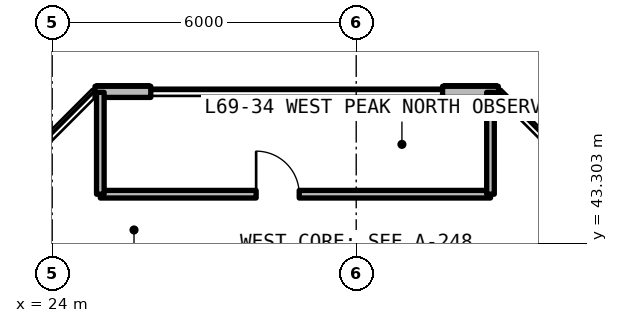
"""IFC4 building model, lengths in metres.
Left out: names, types, materials, properties, quantities, classifications, styles, units other than length and angle.
Written with IfcOpenShell. Run it as: python <this file> out.ifc"""

import sys

from ifc_helpers import new_model, si_unit, direction, frame, frame_2d, origin, place, context, subcontext, project, spatial, rectangle, extrude, element, fill, save


model = new_model("IFC4")
c1 = context("Model", 3, precision=1e-05, world=origin(), true_north=direction((0.0, 1.0)))
c2 = subcontext(c1, "Body", "Model", "MODEL_VIEW")
j1 = project(units=[si_unit("LENGTHUNIT", "METRE"), si_unit("PLANEANGLEUNIT", "RADIAN")], contexts=[c1])
p1 = place(None, origin())
s1 = spatial("IfcSite", under=j1, at=p1, CompositionType="ELEMENT")
p2 = place(p1, origin())
s2 = spatial("IfcBuilding", under=s1, at=p2, CompositionType="ELEMENT")
p3 = place(p2, frame((0.0, 0.0, 246.18)))
s3 = spatial("IfcBuildingStorey", under=s2, at=p3, CompositionType="ELEMENT", Elevation=246.18)
p4 = place(p3, frame((32.804, 46.29, 0.0), z_axis=(0.0, 0.0, 1.0), x_axis=(-1.0, 0.0, 0.0)))
e1 = element("IfcWall", 1, at=p4, inside=s3, PredefinedType="SOLIDWALL", context=c2, shape_type="SweptSolid", body=[
    extrude(rectangle(XDim=1.1, YDim=0.22, at=frame_2d((0.55, 0.0))), origin(), (0.0, 0.0, 1.0), 3.41),
])
p5 = place(p3, frame((25.946, 46.29, 0.0), z_axis=(0.0, 0.0, 1.0), x_axis=(-1.0, 0.0, 0.0)))
e2 = element("IfcWall", 2, at=p5, inside=s3, PredefinedType="SOLIDWALL", context=c2, shape_type="SweptSolid", body=[
    extrude(rectangle(XDim=1.1, YDim=0.22, at=frame_2d((0.55, 0.0))), origin(), (0.0, 0.0, 1.0), 3.41),
])
p6 = place(p3, frame((24.95, 44.27, 0.0), z_axis=(0.0, 0.0, 1.0), x_axis=(1.0, 0.0, 0.0)))
e3 = element("IfcWall", 3, at=p6, inside=s3, PredefinedType="SOLIDWALL", context=c2, shape_type="SweptSolid", body=[
    extrude(rectangle(XDim=7.7, YDim=0.15, at=frame_2d((3.85, 0.0))), origin(), (0.0, 0.0, 1.0), 2.63),
])
p7 = place(p6, frame((3.075, 0.0, 0.0)))
e4 = element("IfcOpeningElement", 4, at=p7, cuts=e3, PredefinedType="OPENING", context=c2, shape_type="SweptSolid", body=[
    extrude(rectangle(XDim=0.85, YDim=2.1, at=frame_2d((0.425, 1.05))), frame((0.0, 0.085, 0.0), z_axis=(0.0, -1.0, 0.0), x_axis=(1.0, 0.0, 0.0)), (0.0, 0.0, 1.0), 0.17),
])
for number, where, z_axis, x_axis in (
    (5, (24.95, 44.27, 0.0), (0.0, 0.0, 1.0), (0.0, 1.0, 0.0)),
    (6, (32.65, 44.27, 0.0), (0.0, 0.0, 1.0), (0.0, 1.0, 0.0)),
):
    element("IfcWall", number, at=place(p3, frame(where, z_axis=z_axis, x_axis=x_axis)), inside=s3, PredefinedType="SOLIDWALL", context=c2, shape_type="SweptSolid", body=[
        extrude(rectangle(XDim=2.01, YDim=0.15, at=frame_2d((1.005, 0.0))), origin(), (0.0, 0.0, 1.0), 2.63),
    ])
p8 = place(p7, origin())
e7 = element("IfcDoor", 7, at=p8, inside=s3, OperationType="SINGLE_SWING_LEFT", PredefinedType="DOOR", context=c2, shape_type="SweptSolid", body=[
    extrude(rectangle(XDim=0.85, YDim=2.1, at=frame_2d((0.425, 1.05))), frame((0.0, 0.025, 0.0), z_axis=(0.0, -1.0, 0.0), x_axis=(1.0, 0.0, 0.0)), (0.0, 0.0, 1.0), 0.05),
])
fill(e4, e7)
save(model, sys.argv[1])
